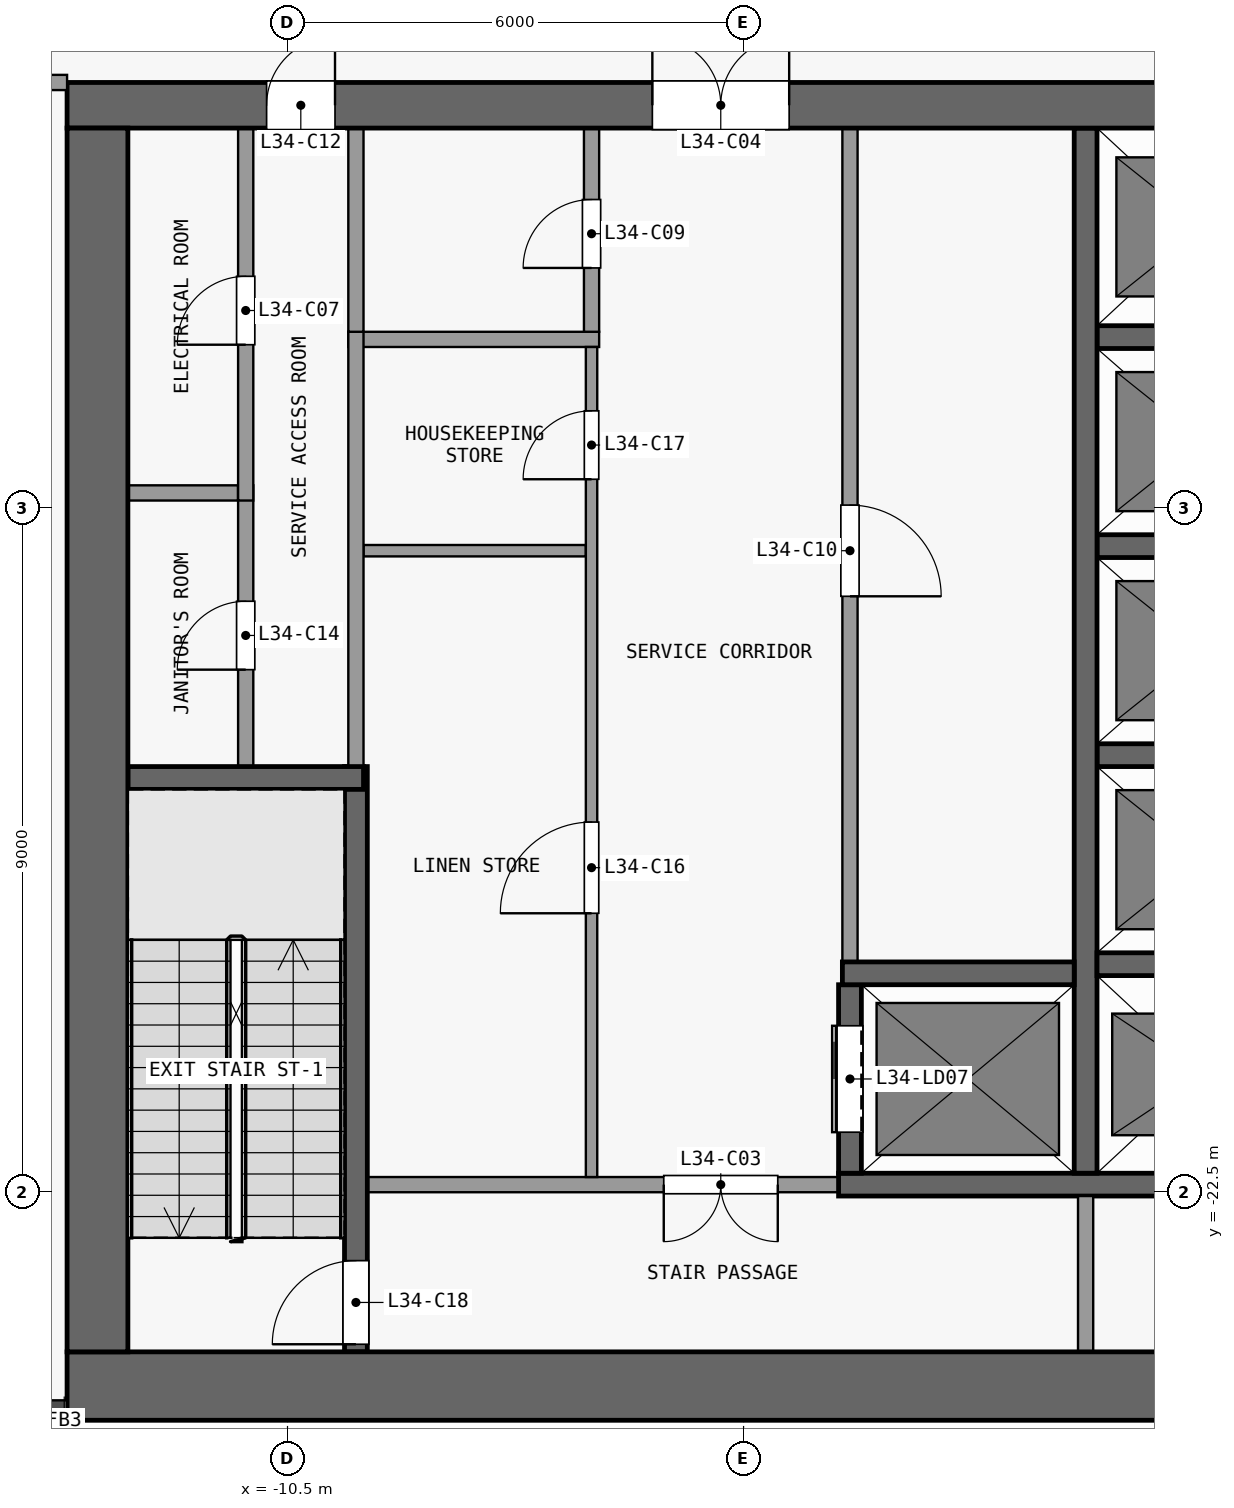
"""IFC4 building model, lengths in metres.
Left out: names, types, materials, properties, quantities, classifications, styles, units other than length and angle.
Written with IfcOpenShell. Run it as: python <this file> out.ifc"""

import sys

from ifc_helpers import new_model, si_unit, direction, frame, frame_2d, origin, place, context, subcontext, project, spatial, rectangle, extrude, element, fill, save


model = new_model("IFC4")
c1 = context("Model", 3, precision=1e-05, world=origin(), true_north=direction((0.0, 1.0)))
c2 = subcontext(c1, "Body", "Model", "MODEL_VIEW")
j1 = project(units=[si_unit("LENGTHUNIT", "METRE"), si_unit("PLANEANGLEUNIT", "RADIAN")], contexts=[c1])
p1 = place(None, origin())
s1 = spatial("IfcSite", under=j1, at=p1, CompositionType="ELEMENT")
p2 = place(p1, origin())
s2 = spatial("IfcBuilding", under=s1, at=p2, CompositionType="ELEMENT")
p3 = place(p2, frame((0.0, 0.0, 138.9)))
s3 = spatial("IfcBuildingStorey", under=s2, at=p3, CompositionType="ELEMENT", Elevation=138.9)
p4 = place(p3, frame((-13.4, -25.05, 0.0), z_axis=(0.0, 0.0, 1.0), x_axis=(1.0, 0.0, 0.0)))
e1 = element("IfcWall", 1, at=p4, inside=s3, PredefinedType="SHEAR", context=c2, shape_type="SweptSolid", body=[
    extrude(rectangle(XDim=26.8, YDim=0.9, at=frame_2d((13.4, 0.0))), origin(), (0.0, 0.0, 1.0), 4.55),
])
p5 = place(p3, frame((-13.4, -8.2, 0.0), z_axis=(0.0, 0.0, 1.0), x_axis=(1.0, 0.0, 0.0)))
e2 = element("IfcWall", 2, at=p5, inside=s3, PredefinedType="SHEAR", context=c2, shape_type="SweptSolid", body=[
    extrude(rectangle(XDim=26.8, YDim=0.6, at=frame_2d((13.4, 0.0))), origin(), (0.0, 0.0, 1.0), 4.55),
])
p6 = place(p5, frame((7.7, 0.0, 0.0)))
e3 = element("IfcOpeningElement", 3, at=p6, cuts=e2, PredefinedType="OPENING", context=c2, shape_type="SweptSolid", body=[
    extrude(rectangle(XDim=1.8, YDim=2.1, at=frame_2d((0.9, 1.05))), frame((0.0, 0.31, 0.0), z_axis=(0.0, -1.0, 0.0), x_axis=(1.0, 0.0, 0.0)), (0.0, 0.0, 1.0), 0.62),
])
p7 = place(p5, frame((17.3, 0.0, 0.0)))
e4 = element("IfcOpeningElement", 4, at=p7, cuts=e2, PredefinedType="OPENING", context=c2, shape_type="SweptSolid", body=[
    extrude(rectangle(XDim=1.8, YDim=2.1, at=frame_2d((0.9, 1.05))), frame((0.0, 0.31, 0.0), z_axis=(0.0, -1.0, 0.0), x_axis=(1.0, 0.0, 0.0)), (0.0, 0.0, 1.0), 0.62),
])
p8 = place(p5, frame((2.625, 0.0, 0.0)))
e5 = element("IfcOpeningElement", 5, at=p8, cuts=e2, PredefinedType="OPENING", context=c2, shape_type="SweptSolid", body=[
    extrude(rectangle(XDim=0.9, YDim=2.1, at=frame_2d((0.45, 1.05))), frame((0.0, 0.31, 0.0), z_axis=(0.0, -1.0, 0.0), x_axis=(1.0, 0.0, 0.0)), (0.0, 0.0, 1.0), 0.62),
])
p9 = place(p5, frame((23.275, 0.0, 0.0)))
e6 = element("IfcOpeningElement", 6, at=p9, cuts=e2, PredefinedType="OPENING", context=c2, shape_type="SweptSolid", body=[
    extrude(rectangle(XDim=0.9, YDim=2.1, at=frame_2d((0.45, 1.05))), frame((0.0, 0.31, 0.0), z_axis=(0.0, -1.0, 0.0), x_axis=(1.0, 0.0, 0.0)), (0.0, 0.0, 1.0), 0.62),
])
p10 = place(p3, frame((-13.0, -24.6, 0.0), z_axis=(0.0, 0.0, 1.0), x_axis=(0.0, 1.0, 0.0)))
e7 = element("IfcWall", 7, at=p10, inside=s3, PredefinedType="SHEAR", context=c2, shape_type="SweptSolid", body=[
    extrude(rectangle(XDim=16.1, YDim=0.8, at=frame_2d((8.05, 0.0))), origin(), (0.0, 0.0, 1.0), 4.55),
])
p11 = place(p3, frame((-3.25, -22.4, 0.0), z_axis=(0.0, 0.0, 1.0), x_axis=(-1.0, 0.0, 0.0)))
e8 = element("IfcWall", 8, at=p11, inside=s3, PredefinedType="PARTITIONING", context=c2, shape_type="SweptSolid", body=[
    extrude(rectangle(XDim=6.2, YDim=0.2, at=frame_2d((3.1, 0.0))), origin(), (0.0, 0.0, 1.0), 4.55),
])
p12 = place(p11, frame((0.8, 0.0, 0.0)))
e9 = element("IfcOpeningElement", 9, at=p12, cuts=e8, PredefinedType="OPENING", context=c2, shape_type="SweptSolid", body=[
    extrude(rectangle(XDim=1.5, YDim=2.1, at=frame_2d((0.75, 1.05))), frame((0.0, 0.11, 0.0), z_axis=(0.0, -1.0, 0.0), x_axis=(1.0, 0.0, 0.0)), (0.0, 0.0, 1.0), 0.22),
])
p13 = place(p3, frame((-3.25, -22.4, 0.0), z_axis=(0.0, 0.0, 1.0), x_axis=(1.0, 0.0, 0.0)))
e10 = element("IfcWall", 10, at=p13, inside=s3, PredefinedType="SHEAR", context=c2, shape_type="SweptSolid", body=[
    extrude(rectangle(XDim=6.2, YDim=0.3, at=frame_2d((3.1, 0.0))), origin(), (0.0, 0.0, 1.0), 4.55),
])
p14 = place(p3, frame((-3.2, -19.62, 0.0), z_axis=(0.0, 0.0, 1.0), x_axis=(1.0, 0.0, 0.0)))
e11 = element("IfcWall", 11, at=p14, inside=s3, PredefinedType="SHEAR", context=c2, shape_type="SweptSolid", body=[
    extrude(rectangle(XDim=3.05, YDim=0.3, at=frame_2d((1.525, 0.0))), origin(), (0.0, 0.0, 1.0), 4.55),
])
p15 = place(p3, frame((0.15, -19.5, 0.0), z_axis=(0.0, 0.0, 1.0), x_axis=(1.0, 0.0, 0.0)))
e12 = element("IfcWall", 12, at=p15, inside=s3, PredefinedType="SHEAR", context=c2, shape_type="SweptSolid", body=[
    extrude(rectangle(XDim=2.8, YDim=0.3, at=frame_2d((1.4, 0.0))), origin(), (0.0, 0.0, 1.0), 4.55),
])
p16 = place(p3, frame((-12.6, -17.05, 0.0), z_axis=(0.0, 0.0, 1.0), x_axis=(1.0, 0.0, 0.0)))
e13 = element("IfcWall", 13, at=p16, inside=s3, PredefinedType="SHEAR", context=c2, shape_type="SweptSolid", body=[
    extrude(rectangle(XDim=3.1, YDim=0.3, at=frame_2d((1.55, 0.0))), origin(), (0.0, 0.0, 1.0), 4.55),
])
p17 = place(p3, frame((0.15, -16.75, 0.0), z_axis=(0.0, 0.0, 1.0), x_axis=(1.0, 0.0, 0.0)))
e14 = element("IfcWall", 14, at=p17, inside=s3, PredefinedType="SHEAR", context=c2, shape_type="SweptSolid", body=[
    extrude(rectangle(XDim=2.8, YDim=0.3, at=frame_2d((1.4, 0.0))), origin(), (0.0, 0.0, 1.0), 4.55),
])
p18 = place(p3, frame((-9.5, -14.06, 0.0), z_axis=(0.0, 0.0, 1.0), x_axis=(1.0, 0.0, 0.0)))
e15 = element("IfcWall", 15, at=p18, inside=s3, PredefinedType="PARTITIONING", context=c2, shape_type="SweptSolid", body=[
    extrude(rectangle(XDim=2.925, YDim=0.15, at=frame_2d((1.462, 0.0))), origin(), (0.0, 0.0, 1.0), 4.55),
])
p19 = place(p3, frame((0.15, -14.0, 0.0), z_axis=(0.0, 0.0, 1.0), x_axis=(1.0, 0.0, 0.0)))
e16 = element("IfcWall", 16, at=p19, inside=s3, PredefinedType="SHEAR", context=c2, shape_type="SweptSolid", body=[
    extrude(rectangle(XDim=2.8, YDim=0.3, at=frame_2d((1.4, 0.0))), origin(), (0.0, 0.0, 1.0), 4.55),
])
p20 = place(p3, frame((-12.6, -13.3, 0.0), z_axis=(0.0, 0.0, 1.0), x_axis=(1.0, 0.0, 0.0)))
e17 = element("IfcWall", 17, at=p20, inside=s3, PredefinedType="PARTITIONING", context=c2, shape_type="SweptSolid", body=[
    extrude(rectangle(XDim=1.45, YDim=0.2, at=frame_2d((0.725, 0.0))), origin(), (0.0, 0.0, 1.0), 4.55),
])
p21 = place(p3, frame((-9.7, -11.28, 0.0), z_axis=(0.0, 0.0, 1.0), x_axis=(1.0, 0.0, 0.0)))
e18 = element("IfcWall", 18, at=p21, inside=s3, PredefinedType="PARTITIONING", context=c2, shape_type="SweptSolid", body=[
    extrude(rectangle(XDim=3.3, YDim=0.2, at=frame_2d((1.65, 0.0))), origin(), (0.0, 0.0, 1.0), 4.55),
])
p22 = place(p3, frame((0.15, -11.25, 0.0), z_axis=(0.0, 0.0, 1.0), x_axis=(1.0, 0.0, 0.0)))
e19 = element("IfcWall", 19, at=p22, inside=s3, PredefinedType="SHEAR", context=c2, shape_type="SweptSolid", body=[
    extrude(rectangle(XDim=2.8, YDim=0.3, at=frame_2d((1.4, 0.0))), origin(), (0.0, 0.0, 1.0), 4.55),
])
p23 = place(p3, frame((-11.05, -16.9, 0.0), z_axis=(0.0, 0.0, 1.0), x_axis=(0.0, 1.0, 0.0)))
e20 = element("IfcWall", 20, at=p23, inside=s3, PredefinedType="PARTITIONING", context=c2, shape_type="SweptSolid", body=[
    extrude(rectangle(XDim=3.7, YDim=0.2, at=frame_2d((1.85, 0.0))), origin(), (0.0, 0.0, 1.0), 4.55),
])
p24 = place(p23, frame((1.275, 0.0, 0.0)))
e21 = element("IfcOpeningElement", 21, at=p24, cuts=e20, PredefinedType="OPENING", context=c2, shape_type="SweptSolid", body=[
    extrude(rectangle(XDim=0.9, YDim=2.1, at=frame_2d((0.45, 1.05))), frame((0.0, 0.11, 0.0), z_axis=(0.0, -1.0, 0.0), x_axis=(1.0, 0.0, 0.0)), (0.0, 0.0, 1.0), 0.22),
])
p25 = place(p3, frame((-11.05, -13.4, 0.0), z_axis=(0.0, 0.0, 1.0), x_axis=(0.0, 1.0, 0.0)))
e22 = element("IfcWall", 22, at=p25, inside=s3, PredefinedType="PARTITIONING", context=c2, shape_type="SweptSolid", body=[
    extrude(rectangle(XDim=4.9, YDim=0.2, at=frame_2d((2.45, 0.0))), origin(), (0.0, 0.0, 1.0), 4.55),
])
p26 = place(p25, frame((2.05, 0.0, 0.0)))
e23 = element("IfcOpeningElement", 23, at=p26, cuts=e22, PredefinedType="OPENING", context=c2, shape_type="SweptSolid", body=[
    extrude(rectangle(XDim=0.9, YDim=2.1, at=frame_2d((0.45, 1.05))), frame((0.0, 0.11, 0.0), z_axis=(0.0, -1.0, 0.0), x_axis=(1.0, 0.0, 0.0)), (0.0, 0.0, 1.0), 0.22),
])
p27 = place(p3, frame((-9.6, -24.6, 0.0), z_axis=(0.0, 0.0, 1.0), x_axis=(0.0, 1.0, 0.0)))
e24 = element("IfcWall", 24, at=p27, inside=s3, PredefinedType="SHEAR", context=c2, shape_type="SweptSolid", body=[
    extrude(rectangle(XDim=7.7, YDim=0.3, at=frame_2d((3.85, 0.0))), origin(), (0.0, 0.0, 1.0), 4.55),
])
p28 = place(p27, frame((0.1, 0.0, 0.0)))
e25 = element("IfcOpeningElement", 25, at=p28, cuts=e24, PredefinedType="OPENING", context=c2, shape_type="SweptSolid", body=[
    extrude(rectangle(XDim=1.1, YDim=2.1, at=frame_2d((0.55, 1.05))), frame((0.0, 0.16, 0.0), z_axis=(0.0, -1.0, 0.0), x_axis=(1.0, 0.0, 0.0)), (0.0, 0.0, 1.0), 0.32),
])
p29 = place(p3, frame((-9.6, -16.9, 0.0), z_axis=(0.0, 0.0, 1.0), x_axis=(0.0, 1.0, 0.0)))
e26 = element("IfcWall", 26, at=p29, inside=s3, PredefinedType="PARTITIONING", context=c2, shape_type="SweptSolid", body=[
    extrude(rectangle(XDim=5.72, YDim=0.2, at=frame_2d((2.86, 0.0))), origin(), (0.0, 0.0, 1.0), 4.55),
])
p30 = place(p3, frame((-9.6, -11.18, 0.0), z_axis=(0.0, 0.0, 1.0), x_axis=(0.0, 1.0, 0.0)))
e27 = element("IfcWall", 27, at=p30, inside=s3, PredefinedType="PARTITIONING", context=c2, shape_type="SweptSolid", body=[
    extrude(rectangle(XDim=2.68, YDim=0.2, at=frame_2d((1.34, 0.0))), origin(), (0.0, 0.0, 1.0), 4.55),
])
p31 = place(p3, frame((-6.5, -22.3, 0.0), z_axis=(0.0, 0.0, 1.0), x_axis=(0.0, 1.0, 0.0)))
e28 = element("IfcWall", 28, at=p31, inside=s3, PredefinedType="PARTITIONING", context=c2, shape_type="SweptSolid", body=[
    extrude(rectangle(XDim=10.92, YDim=0.15, at=frame_2d((5.46, 0.0))), origin(), (0.0, 0.0, 1.0), 4.55),
])
p32 = place(p31, frame((3.47, 0.0, 0.0)))
e29 = element("IfcOpeningElement", 29, at=p32, cuts=e28, PredefinedType="OPENING", context=c2, shape_type="SweptSolid", body=[
    extrude(rectangle(XDim=1.2, YDim=2.1, at=frame_2d((0.6, 1.05))), frame((0.0, 0.085, 0.0), z_axis=(0.0, -1.0, 0.0), x_axis=(1.0, 0.0, 0.0)), (0.0, 0.0, 1.0), 0.17),
])
p33 = place(p31, frame((9.18, 0.0, 0.0)))
e30 = element("IfcOpeningElement", 30, at=p33, cuts=e28, PredefinedType="OPENING", context=c2, shape_type="SweptSolid", body=[
    extrude(rectangle(XDim=0.9, YDim=2.1, at=frame_2d((0.45, 1.05))), frame((0.0, 0.085, 0.0), z_axis=(0.0, -1.0, 0.0), x_axis=(1.0, 0.0, 0.0)), (0.0, 0.0, 1.0), 0.17),
])
p34 = place(p3, frame((-6.5, -11.18, 0.0), z_axis=(0.0, 0.0, 1.0), x_axis=(0.0, 1.0, 0.0)))
e31 = element("IfcWall", 31, at=p34, inside=s3, PredefinedType="PARTITIONING", context=c2, shape_type="SweptSolid", body=[
    extrude(rectangle(XDim=2.68, YDim=0.2, at=frame_2d((1.34, 0.0))), origin(), (0.0, 0.0, 1.0), 4.55),
])
p35 = place(p34, frame((0.84, 0.0, 0.0)))
e32 = element("IfcOpeningElement", 32, at=p35, cuts=e31, PredefinedType="OPENING", context=c2, shape_type="SweptSolid", body=[
    extrude(rectangle(XDim=0.9, YDim=2.1, at=frame_2d((0.45, 1.05))), frame((0.0, 0.11, 0.0), z_axis=(0.0, -1.0, 0.0), x_axis=(1.0, 0.0, 0.0)), (0.0, 0.0, 1.0), 0.22),
])
p36 = place(p3, frame((-3.1, -22.25, 0.0), z_axis=(0.0, 0.0, 1.0), x_axis=(0.0, 1.0, 0.0)))
e33 = element("IfcWall", 33, at=p36, inside=s3, PredefinedType="SHEAR", context=c2, shape_type="SweptSolid", body=[
    extrude(rectangle(XDim=2.48, YDim=0.3, at=frame_2d((1.24, 0.0))), origin(), (0.0, 0.0, 1.0), 4.55),
])
p37 = place(p36, frame((0.54, 0.0, 0.0)))
e34 = element("IfcOpeningElement", 34, at=p37, cuts=e33, PredefinedType="OPENING", context=c2, shape_type="SweptSolid", body=[
    extrude(rectangle(XDim=1.4, YDim=2.1, at=frame_2d((0.7, 1.05))), frame((0.0, 0.16, 0.0), z_axis=(0.0, -1.0, 0.0), x_axis=(1.0, 0.0, 0.0)), (0.0, 0.0, 1.0), 0.32),
])
p38 = place(p3, frame((-3.1, -8.5, 0.0), z_axis=(0.0, 0.0, 1.0), x_axis=(0.0, -1.0, 0.0)))
e35 = element("IfcWall", 35, at=p38, inside=s3, PredefinedType="PARTITIONING", context=c2, shape_type="SweptSolid", body=[
    extrude(rectangle(XDim=10.97, YDim=0.2, at=frame_2d((5.485, 0.0))), origin(), (0.0, 0.0, 1.0), 4.55),
])
p39 = place(p38, frame((4.96, 0.0, 0.0)))
e36 = element("IfcOpeningElement", 36, at=p39, cuts=e35, PredefinedType="OPENING", context=c2, shape_type="SweptSolid", body=[
    extrude(rectangle(XDim=1.2, YDim=2.1, at=frame_2d((0.6, 1.05))), frame((0.0, 0.11, 0.0), z_axis=(0.0, -1.0, 0.0), x_axis=(1.0, 0.0, 0.0)), (0.0, 0.0, 1.0), 0.22),
])
p40 = place(p3, frame((0.0, -24.6, 0.0), z_axis=(0.0, 0.0, 1.0), x_axis=(0.0, 1.0, 0.0)))
e37 = element("IfcWall", 37, at=p40, inside=s3, PredefinedType="PARTITIONING", context=c2, shape_type="SweptSolid", body=[
    extrude(rectangle(XDim=2.05, YDim=0.2, at=frame_2d((1.025, 0.0))), origin(), (0.0, 0.0, 1.0), 4.55),
])
p41 = place(p3, frame((0.0, -22.25, 0.0), z_axis=(0.0, 0.0, 1.0), x_axis=(0.0, 1.0, 0.0)))
e38 = element("IfcWall", 38, at=p41, inside=s3, PredefinedType="SHEAR", context=c2, shape_type="SweptSolid", body=[
    extrude(rectangle(XDim=13.75, YDim=0.3, at=frame_2d((6.875, 0.0))), origin(), (0.0, 0.0, 1.0), 4.55),
])
p42 = place(p3, frame((-25.238, -7.9, 0.0), z_axis=(0.0, 0.0, 1.0), x_axis=(1.0, 0.0, 0.0)))
e39 = element("IfcWall", 39, at=p42, inside=s3, PredefinedType="PARTITIONING", context=c2, shape_type="SweptSolid", body=[
    extrude(rectangle(XDim=11.838, YDim=0.2, at=frame_2d((5.919, 0.0))), origin(), (0.0, 0.0, 1.0), 4.55),
])
p43 = place(p42, frame((1.788, 0.0, 0.0)))
e40 = element("IfcOpeningElement", 40, at=p43, cuts=e39, PredefinedType="OPENING", context=c2, shape_type="SweptSolid", body=[
    extrude(rectangle(XDim=1.0, YDim=2.1, at=frame_2d((0.5, 1.05))), frame((0.0, 0.11, 0.0), z_axis=(0.0, -1.0, 0.0), x_axis=(1.0, 0.0, 0.0)), (0.0, 0.0, 1.0), 0.22),
])
p44 = place(p42, frame((8.988, 0.0, 0.0)))
e41 = element("IfcOpeningElement", 41, at=p44, cuts=e39, PredefinedType="OPENING", context=c2, shape_type="SweptSolid", body=[
    extrude(rectangle(XDim=1.0, YDim=2.1, at=frame_2d((0.5, 1.05))), frame((0.0, 0.11, 0.0), z_axis=(0.0, -1.0, 0.0), x_axis=(1.0, 0.0, 0.0)), (0.0, 0.0, 1.0), 0.22),
])
p45 = place(p37, origin())
e42 = element("IfcDoor", 42, at=p45, inside=s3, OperationType="DOUBLE_DOOR_SLIDING", PredefinedType="DOOR", context=c2, shape_type="SweptSolid", body=[
    extrude(rectangle(XDim=1.4, YDim=2.1, at=frame_2d((0.7, 1.05))), frame((0.0, 0.025, 0.0), z_axis=(0.0, -1.0, 0.0), x_axis=(1.0, 0.0, 0.0)), (0.0, 0.0, 1.0), 0.05),
])
fill(e34, e42)
p46 = place(p12, origin())
e43 = element("IfcDoor", 43, at=p46, inside=s3, OperationType="DOUBLE_DOOR_SINGLE_SWING", PredefinedType="DOOR", context=c2, shape_type="SweptSolid", body=[
    extrude(rectangle(XDim=1.5, YDim=2.1, at=frame_2d((0.75, 1.05))), frame((0.0, 0.025, 0.0), z_axis=(0.0, -1.0, 0.0), x_axis=(1.0, 0.0, 0.0)), (0.0, 0.0, 1.0), 0.05),
])
fill(e9, e43)
p47 = place(p6, origin())
e44 = element("IfcDoor", 44, at=p47, inside=s3, OperationType="DOUBLE_DOOR_SINGLE_SWING", PredefinedType="DOOR", context=c2, shape_type="SweptSolid", body=[
    extrude(rectangle(XDim=1.8, YDim=2.1, at=frame_2d((0.9, 1.05))), frame((0.0, 0.025, 0.0), z_axis=(0.0, -1.0, 0.0), x_axis=(1.0, 0.0, 0.0)), (0.0, 0.0, 1.0), 0.05),
])
fill(e3, e44)
p48 = place(p26, origin())
e45 = element("IfcDoor", 45, at=p48, inside=s3, OperationType="SINGLE_SWING_LEFT", PredefinedType="DOOR", context=c2, shape_type="SweptSolid", body=[
    extrude(rectangle(XDim=0.9, YDim=2.1, at=frame_2d((0.45, 1.05))), frame((0.0, 0.025, 0.0), z_axis=(0.0, -1.0, 0.0), x_axis=(1.0, 0.0, 0.0)), (0.0, 0.0, 1.0), 0.05),
])
fill(e23, e45)
p49 = place(p35, origin())
e46 = element("IfcDoor", 46, at=p49, inside=s3, OperationType="SINGLE_SWING_LEFT", PredefinedType="DOOR", context=c2, shape_type="SweptSolid", body=[
    extrude(rectangle(XDim=0.9, YDim=2.1, at=frame_2d((0.45, 1.05))), frame((0.0, 0.025, 0.0), z_axis=(0.0, -1.0, 0.0), x_axis=(1.0, 0.0, 0.0)), (0.0, 0.0, 1.0), 0.05),
])
fill(e32, e46)
p50 = place(p39, origin())
e47 = element("IfcDoor", 47, at=p50, inside=s3, OperationType="SINGLE_SWING_RIGHT", PredefinedType="DOOR", context=c2, shape_type="SweptSolid", body=[
    extrude(rectangle(XDim=1.2, YDim=2.1, at=frame_2d((0.6, 1.05))), frame((0.0, 0.025, 0.0), z_axis=(0.0, -1.0, 0.0), x_axis=(1.0, 0.0, 0.0)), (0.0, 0.0, 1.0), 0.05),
])
fill(e36, e47)
p51 = place(p8, origin())
e48 = element("IfcDoor", 48, at=p51, inside=s3, OperationType="SINGLE_SWING_RIGHT", PredefinedType="DOOR", context=c2, shape_type="SweptSolid", body=[
    extrude(rectangle(XDim=0.9, YDim=2.1, at=frame_2d((0.45, 1.05))), frame((0.0, 0.025, 0.0), z_axis=(0.0, -1.0, 0.0), x_axis=(1.0, 0.0, 0.0)), (0.0, 0.0, 1.0), 0.05),
])
fill(e5, e48)
p52 = place(p24, origin())
e49 = element("IfcDoor", 49, at=p52, inside=s3, OperationType="SINGLE_SWING_LEFT", PredefinedType="DOOR", context=c2, shape_type="SweptSolid", body=[
    extrude(rectangle(XDim=0.9, YDim=2.1, at=frame_2d((0.45, 1.05))), frame((0.0, 0.025, 0.0), z_axis=(0.0, -1.0, 0.0), x_axis=(1.0, 0.0, 0.0)), (0.0, 0.0, 1.0), 0.05),
])
fill(e21, e49)
p53 = place(p32, origin())
e50 = element("IfcDoor", 50, at=p53, inside=s3, OperationType="SINGLE_SWING_LEFT", PredefinedType="DOOR", context=c2, shape_type="SweptSolid", body=[
    extrude(rectangle(XDim=1.2, YDim=2.1, at=frame_2d((0.6, 1.05))), frame((0.0, 0.025, 0.0), z_axis=(0.0, -1.0, 0.0), x_axis=(1.0, 0.0, 0.0)), (0.0, 0.0, 1.0), 0.05),
])
fill(e29, e50)
p54 = place(p33, origin())
e51 = element("IfcDoor", 51, at=p54, inside=s3, OperationType="SINGLE_SWING_LEFT", PredefinedType="DOOR", context=c2, shape_type="SweptSolid", body=[
    extrude(rectangle(XDim=0.9, YDim=2.1, at=frame_2d((0.45, 1.05))), frame((0.0, 0.025, 0.0), z_axis=(0.0, -1.0, 0.0), x_axis=(1.0, 0.0, 0.0)), (0.0, 0.0, 1.0), 0.05),
])
fill(e30, e51)
p55 = place(p28, origin())
e52 = element("IfcDoor", 52, at=p55, inside=s3, OperationType="SINGLE_SWING_LEFT", PredefinedType="DOOR", context=c2, shape_type="SweptSolid", body=[
    extrude(rectangle(XDim=1.1, YDim=2.1, at=frame_2d((0.55, 1.05))), frame((0.0, 0.025, 0.0), z_axis=(0.0, -1.0, 0.0), x_axis=(1.0, 0.0, 0.0)), (0.0, 0.0, 1.0), 0.05),
])
fill(e25, e52)
save(model, sys.argv[1])
